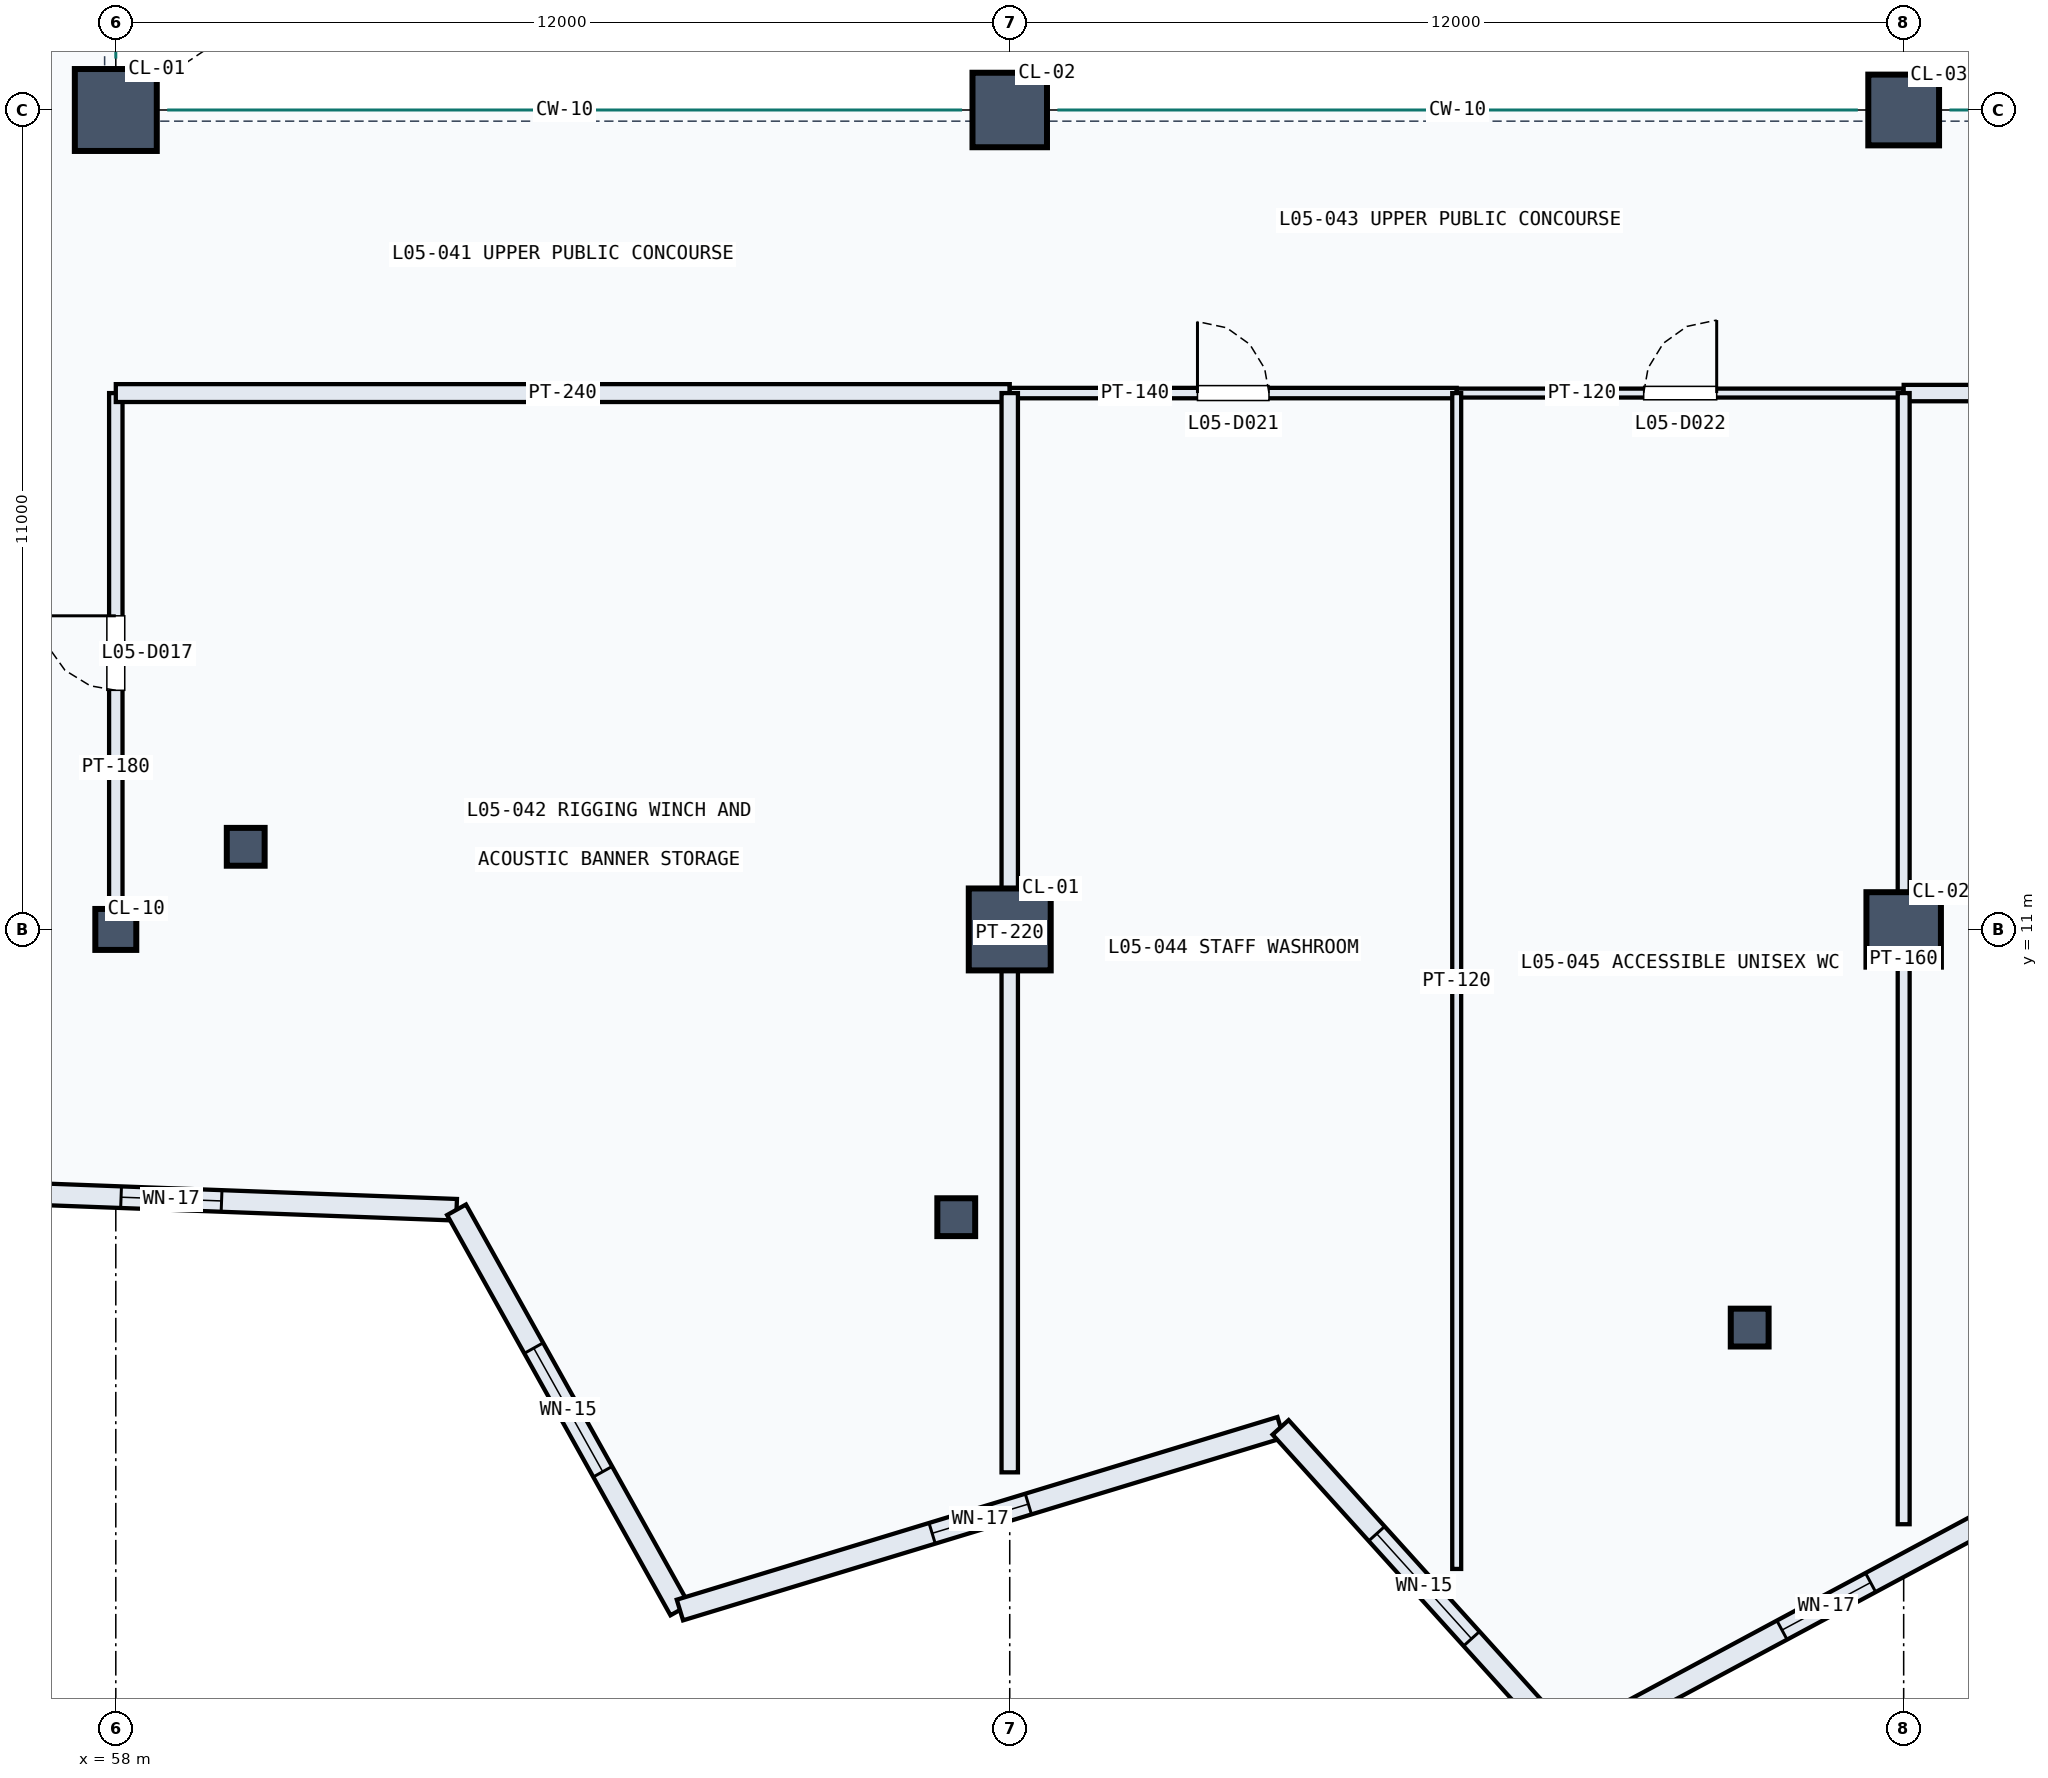
"""IFC4 building model, lengths in metres.
Left out: names, types, materials, properties, quantities, classifications, styles, units other than length and angle.
Written with IfcOpenShell. Run it as: python <this file> out.ifc"""

import sys

from ifc_helpers import new_model, si_unit, direction, frame, frame_2d, origin, origin_2d, place, context, subcontext, project, spatial, rectangle, hollow_circle, extrude, element, fill, save


model = new_model("IFC4")
c1 = context("Model", 3, precision=1e-05, world=origin(), true_north=direction((0.0, 1.0)))
c2 = subcontext(c1, "Body", "Model", "MODEL_VIEW")
j1 = project(units=[si_unit("LENGTHUNIT", "METRE"), si_unit("PLANEANGLEUNIT", "RADIAN")], contexts=[c1])
p1 = place(None, origin())
s1 = spatial("IfcSite", under=j1, at=p1, CompositionType="ELEMENT")
p2 = place(p1, origin())
s2 = spatial("IfcBuilding", under=s1, at=p2, CompositionType="ELEMENT")
p3 = place(p2, frame((0.0, 0.0, 24.3)))
s3 = spatial("IfcBuildingStorey", under=s2, at=p3, CompositionType="ELEMENT", Elevation=24.3)
p4 = place(p3, frame((58.0, 11.0, 0.0), z_axis=(0.0, 0.0, 1.0), x_axis=(1.0, 0.0, 0.0)))
e1 = element("IfcColumn", 1, at=p4, inside=s3, PredefinedType="COLUMN", context=c2, shape_type="SweptSolid", body=[
    extrude(rectangle(XDim=0.55, YDim=0.55, at=origin_2d()), origin(), (0.0, 0.0, 1.0), 5.4),
])
for number, where, z_axis, x_axis in (
    (2, (58.0, 22.0, 0.0), (0.0, 0.0, 1.0), (1.0, 0.0, 0.0)),
    (3, (70.0, 11.0, 0.0), (0.0, 0.0, 1.0), (1.0, 0.0, 0.0)),
):
    element("IfcColumn", number, at=place(p3, frame(where, z_axis=z_axis, x_axis=x_axis)), inside=s3, PredefinedType="COLUMN", context=c2, shape_type="SweptSolid", body=[
        extrude(rectangle(XDim=1.1, YDim=1.1, at=origin_2d()), origin(), (0.0, 0.0, 1.0), 5.4),
    ])
for number, where, z_axis, x_axis in (
    (4, (70.0, 22.0, 0.0), (0.0, 0.0, 1.0), (1.0, 0.0, 0.0)),
    (5, (82.0, 11.0, 0.0), (0.0, 0.0, 1.0), (1.0, 0.0, 0.0)),
):
    element("IfcColumn", number, at=place(p3, frame(where, z_axis=z_axis, x_axis=x_axis)), inside=s3, PredefinedType="COLUMN", context=c2, shape_type="SweptSolid", body=[
        extrude(rectangle(XDim=1.0, YDim=1.0, at=origin_2d()), origin(), (0.0, 0.0, 1.0), 5.4),
    ])
p5 = place(p3, frame((82.0, 22.0, 0.0), z_axis=(0.0, 0.0, 1.0), x_axis=(1.0, 0.0, 0.0)))
e6 = element("IfcColumn", 6, at=p5, inside=s3, PredefinedType="COLUMN", context=c2, shape_type="SweptSolid", body=[
    extrude(rectangle(XDim=0.95, YDim=0.95, at=origin_2d()), origin(), (0.0, 0.0, 1.0), 5.4),
])
for number, where, z_axis, x_axis in (
    (7, (59.744, 12.109, 0.0), (0.0, 0.0, 1.0), (1.0, 0.0, 0.0)),
    (8, (69.282, 7.137, 0.0), (0.0, 0.0, 1.0), (1.0, 0.0, 0.0)),
    (9, (79.933, 5.655, 0.0), (0.0, 0.0, 1.0), (1.0, 0.0, 0.0)),
):
    element("IfcColumn", number, at=place(p3, frame(where, z_axis=z_axis, x_axis=x_axis)), inside=s3, PredefinedType="COLUMN", context=c2, shape_type="SweptSolid", body=[
        extrude(hollow_circle(Radius=0.254, WallThickness=0.02, at=origin_2d()), origin(), (0.0, 0.0, 1.0), 6.05),
    ])
p6 = place(p3, frame((54.917, 7.524, 0.0), z_axis=(0.0, 0.0, 1.0), x_axis=(0.999297884119, -0.037466502319, 0.0)))
e10 = element("IfcWall", 10, at=p6, inside=s3, PredefinedType="USERDEFINED", context=c2, shape_type="SweptSolid", body=[
    extrude(rectangle(XDim=7.663, YDim=0.29, at=frame_2d((3.832, 0.0))), origin(), (0.0, 0.0, 1.0), 4.34),
])
p7 = place(p6, frame((3.156, 0.0, 0.8)))
e11 = element("IfcOpeningElement", 11, at=p7, cuts=e10, PredefinedType="OPENING", context=c2, shape_type="SweptSolid", body=[
    extrude(rectangle(XDim=1.35, YDim=2.1, at=frame_2d((0.675, 1.05))), frame((0.0, 0.155, 0.0), z_axis=(0.0, -1.0, 0.0), x_axis=(1.0, 0.0, 0.0)), (0.0, 0.0, 1.0), 0.31),
])
p8 = place(p3, frame((62.574, 7.237, 0.0), z_axis=(0.0, 0.0, 1.0), x_axis=(0.487306352228, -0.87323108, 0.0)))
e12 = element("IfcWall", 12, at=p8, inside=s3, PredefinedType="USERDEFINED", context=c2, shape_type="SweptSolid", body=[
    extrude(rectangle(XDim=6.153, YDim=0.29, at=frame_2d((3.076, 0.0))), origin(), (0.0, 0.0, 1.0), 4.34),
])
p9 = place(p8, frame((2.126, 0.0, 0.85)))
e13 = element("IfcOpeningElement", 13, at=p9, cuts=e12, PredefinedType="OPENING", context=c2, shape_type="SweptSolid", body=[
    extrude(rectangle(XDim=1.9, YDim=1.6, at=frame_2d((0.95, 0.8))), frame((0.0, 0.155, 0.0), z_axis=(0.0, -1.0, 0.0), x_axis=(1.0, 0.0, 0.0)), (0.0, 0.0, 1.0), 0.31),
])
p10 = place(p3, frame((65.573, 1.864, 0.0), z_axis=(0.0, 0.0, 1.0), x_axis=(0.956738407321, 0.290949514446, 0.0)))
e14 = element("IfcWall", 14, at=p10, inside=s3, PredefinedType="USERDEFINED", context=c2, shape_type="SweptSolid", body=[
    extrude(rectangle(XDim=8.428, YDim=0.29, at=frame_2d((4.214, 0.0))), origin(), (0.0, 0.0, 1.0), 4.34),
])
p11 = place(p10, frame((3.539, 0.0, 0.8)))
e15 = element("IfcOpeningElement", 15, at=p11, cuts=e14, PredefinedType="OPENING", context=c2, shape_type="SweptSolid", body=[
    extrude(rectangle(XDim=1.35, YDim=2.1, at=frame_2d((0.675, 1.05))), frame((0.0, 0.155, 0.0), z_axis=(0.0, -1.0, 0.0), x_axis=(1.0, 0.0, 0.0)), (0.0, 0.0, 1.0), 0.31),
])
p12 = place(p3, frame((73.636, 4.316, 0.0), z_axis=(0.0, 0.0, 1.0), x_axis=(0.670348131104, -0.742046752654, 0.0)))
e16 = element("IfcWall", 16, at=p12, inside=s3, PredefinedType="USERDEFINED", context=c2, shape_type="SweptSolid", body=[
    extrude(rectangle(XDim=5.748, YDim=0.29, at=frame_2d((2.874, 0.0))), origin(), (0.0, 0.0, 1.0), 4.34),
])
p13 = place(p12, frame((1.924, 0.0, 0.85)))
e17 = element("IfcOpeningElement", 17, at=p13, cuts=e16, PredefinedType="OPENING", context=c2, shape_type="SweptSolid", body=[
    extrude(rectangle(XDim=1.9, YDim=1.6, at=frame_2d((0.95, 0.8))), frame((0.0, 0.155, 0.0), z_axis=(0.0, -1.0, 0.0), x_axis=(1.0, 0.0, 0.0)), (0.0, 0.0, 1.0), 0.31),
])
p14 = place(p3, frame((77.489, 0.051, 0.0), z_axis=(0.0, 0.0, 1.0), x_axis=(0.881201188687, 0.472741435731, 0.0)))
e18 = element("IfcWall", 18, at=p14, inside=s3, PredefinedType="USERDEFINED", context=c2, shape_type="SweptSolid", body=[
    extrude(rectangle(XDim=7.881, YDim=0.29, at=frame_2d((3.94, 0.0))), origin(), (0.0, 0.0, 1.0), 4.34),
])
p15 = place(p14, frame((3.265, 0.0, 0.8)))
e19 = element("IfcOpeningElement", 19, at=p15, cuts=e18, PredefinedType="OPENING", context=c2, shape_type="SweptSolid", body=[
    extrude(rectangle(XDim=1.35, YDim=2.1, at=frame_2d((0.675, 1.05))), frame((0.0, 0.155, 0.0), z_axis=(0.0, -1.0, 0.0), x_axis=(1.0, 0.0, 0.0)), (0.0, 0.0, 1.0), 0.31),
])
p16 = place(p3, frame((58.0, 11.22, 0.0), z_axis=(0.0, 0.0, 1.0), x_axis=(0.0, 1.0, 0.0)))
e20 = element("IfcWall", 20, at=p16, inside=s3, PredefinedType="PARTITIONING", context=c2, shape_type="SweptSolid", body=[
    extrude(rectangle(XDim=6.98, YDim=0.18, at=frame_2d((3.49, 0.0))), origin(), (0.0, 0.0, 1.0), 5.18),
])
p17 = place(p16, frame((2.99, 0.0, 0.0)))
e21 = element("IfcOpeningElement", 21, at=p17, cuts=e20, PredefinedType="OPENING", context=c2, shape_type="SweptSolid", body=[
    extrude(rectangle(XDim=1.0, YDim=2.15, at=frame_2d((0.5, 1.075))), frame((0.0, 0.1, 0.0), z_axis=(0.0, -1.0, 0.0), x_axis=(1.0, 0.0, 0.0)), (0.0, 0.0, 1.0), 0.2),
])
p18 = place(p3, frame((58.0, 18.2, 0.0), z_axis=(0.0, 0.0, 1.0), x_axis=(1.0, 0.0, 0.0)))
e22 = element("IfcWall", 22, at=p18, inside=s3, PredefinedType="PARTITIONING", context=c2, shape_type="SweptSolid", body=[
    extrude(rectangle(XDim=12.0, YDim=0.24, at=frame_2d((6.0, 0.0))), origin(), (0.0, 0.0, 1.0), 5.18),
])
p19 = place(p3, frame((70.0, 18.2, 0.0), z_axis=(0.0, 0.0, 1.0), x_axis=(1.0, 0.0, 0.0)))
e23 = element("IfcWall", 23, at=p19, inside=s3, PredefinedType="PARTITIONING", context=c2, shape_type="SweptSolid", body=[
    extrude(rectangle(XDim=6.0, YDim=0.14, at=frame_2d((3.0, 0.0))), origin(), (0.0, 0.0, 1.0), 5.18),
])
p20 = place(p19, frame((2.52, 0.0, 0.0)))
e24 = element("IfcOpeningElement", 24, at=p20, cuts=e23, PredefinedType="OPENING", context=c2, shape_type="SweptSolid", body=[
    extrude(rectangle(XDim=0.96, YDim=2.15, at=frame_2d((0.48, 1.075))), frame((0.0, 0.08, 0.0), z_axis=(0.0, -1.0, 0.0), x_axis=(1.0, 0.0, 0.0)), (0.0, 0.0, 1.0), 0.16),
])
p21 = place(p3, frame((76.0, 18.2, 0.0), z_axis=(0.0, 0.0, 1.0), x_axis=(1.0, 0.0, 0.0)))
e25 = element("IfcWall", 25, at=p21, inside=s3, PredefinedType="PARTITIONING", context=c2, shape_type="SweptSolid", body=[
    extrude(rectangle(XDim=6.0, YDim=0.12, at=frame_2d((3.0, 0.0))), origin(), (0.0, 0.0, 1.0), 5.18),
])
p22 = place(p21, frame((2.51, 0.0, 0.0)))
e26 = element("IfcOpeningElement", 26, at=p22, cuts=e25, PredefinedType="OPENING", context=c2, shape_type="SweptSolid", body=[
    extrude(rectangle(XDim=0.98, YDim=2.1, at=frame_2d((0.49, 1.05))), frame((0.0, 0.07, 0.0), z_axis=(0.0, -1.0, 0.0), x_axis=(1.0, 0.0, 0.0)), (0.0, 0.0, 1.0), 0.14),
])
p23 = place(p3, frame((82.0, 18.2, 0.0), z_axis=(0.0, 0.0, 1.0), x_axis=(1.0, 0.0, 0.0)))
e27 = element("IfcWall", 27, at=p23, inside=s3, PredefinedType="PARTITIONING", context=c2, shape_type="SweptSolid", body=[
    extrude(rectangle(XDim=12.0, YDim=0.22, at=frame_2d((6.0, 0.0))), origin(), (0.0, 0.0, 1.0), 5.18),
])
p24 = place(p23, frame((5.47, 0.0, 0.0)))
e28 = element("IfcOpeningElement", 28, at=p24, cuts=e27, PredefinedType="OPENING", context=c2, shape_type="SweptSolid", body=[
    extrude(rectangle(XDim=1.06, YDim=2.3, at=frame_2d((0.53, 1.15))), frame((0.0, 0.12, 0.0), z_axis=(0.0, -1.0, 0.0), x_axis=(1.0, 0.0, 0.0)), (0.0, 0.0, 1.0), 0.24),
])
p25 = place(p3, frame((70.0, 3.712, 0.0), z_axis=(0.0, 0.0, 1.0), x_axis=(0.0, 1.0, 0.0)))
e29 = element("IfcWall", 29, at=p25, inside=s3, PredefinedType="PARTITIONING", context=c2, shape_type="SweptSolid", body=[
    extrude(rectangle(XDim=14.488, YDim=0.22, at=frame_2d((7.244, 0.0))), origin(), (0.0, 0.0, 1.0), 5.18),
])
p26 = place(p3, frame((76.0, 2.415, 0.0), z_axis=(0.0, 0.0, 1.0), x_axis=(0.0, 1.0, 0.0)))
e30 = element("IfcWall", 30, at=p26, inside=s3, PredefinedType="PARTITIONING", context=c2, shape_type="SweptSolid", body=[
    extrude(rectangle(XDim=15.785, YDim=0.12, at=frame_2d((7.892, 0.0))), origin(), (0.0, 0.0, 1.0), 5.18),
])
p27 = place(p3, frame((82.0, 3.016, 0.0), z_axis=(0.0, 0.0, 1.0), x_axis=(0.0, 1.0, 0.0)))
e31 = element("IfcWall", 31, at=p27, inside=s3, PredefinedType="PARTITIONING", context=c2, shape_type="SweptSolid", body=[
    extrude(rectangle(XDim=15.184, YDim=0.16, at=frame_2d((7.592, 0.0))), origin(), (0.0, 0.0, 1.0), 5.18),
])
p28 = place(p7, origin())
e32 = element("IfcWindow", 32, at=p28, inside=s3, PartitioningType="SINGLE_PANEL", PredefinedType="WINDOW", context=c2, shape_type="SweptSolid", body=[
    extrude(rectangle(XDim=1.35, YDim=2.1, at=frame_2d((0.675, 1.05))), frame((0.0, 0.03, 0.0), z_axis=(0.0, -1.0, 0.0), x_axis=(1.0, 0.0, 0.0)), (0.0, 0.0, 1.0), 0.06),
])
fill(e11, e32)
p29 = place(p9, origin())
e33 = element("IfcWindow", 33, at=p29, inside=s3, PartitioningType="SINGLE_PANEL", PredefinedType="WINDOW", context=c2, shape_type="SweptSolid", body=[
    extrude(rectangle(XDim=1.9, YDim=1.6, at=frame_2d((0.95, 0.8))), frame((0.0, 0.03, 0.0), z_axis=(0.0, -1.0, 0.0), x_axis=(1.0, 0.0, 0.0)), (0.0, 0.0, 1.0), 0.06),
])
fill(e13, e33)
p30 = place(p11, origin())
e34 = element("IfcWindow", 34, at=p30, inside=s3, PartitioningType="SINGLE_PANEL", PredefinedType="WINDOW", context=c2, shape_type="SweptSolid", body=[
    extrude(rectangle(XDim=1.35, YDim=2.1, at=frame_2d((0.675, 1.05))), frame((0.0, 0.03, 0.0), z_axis=(0.0, -1.0, 0.0), x_axis=(1.0, 0.0, 0.0)), (0.0, 0.0, 1.0), 0.06),
])
fill(e15, e34)
p31 = place(p13, origin())
e35 = element("IfcWindow", 35, at=p31, inside=s3, PartitioningType="SINGLE_PANEL", PredefinedType="WINDOW", context=c2, shape_type="SweptSolid", body=[
    extrude(rectangle(XDim=1.9, YDim=1.6, at=frame_2d((0.95, 0.8))), frame((0.0, 0.03, 0.0), z_axis=(0.0, -1.0, 0.0), x_axis=(1.0, 0.0, 0.0)), (0.0, 0.0, 1.0), 0.06),
])
fill(e17, e35)
p32 = place(p15, origin())
e36 = element("IfcWindow", 36, at=p32, inside=s3, PartitioningType="SINGLE_PANEL", PredefinedType="WINDOW", context=c2, shape_type="SweptSolid", body=[
    extrude(rectangle(XDim=1.35, YDim=2.1, at=frame_2d((0.675, 1.05))), frame((0.0, 0.03, 0.0), z_axis=(0.0, -1.0, 0.0), x_axis=(1.0, 0.0, 0.0)), (0.0, 0.0, 1.0), 0.06),
])
fill(e19, e36)
p33 = place(p17, origin())
e37 = element("IfcDoor", 37, at=p33, inside=s3, OperationType="SINGLE_SWING_RIGHT", PredefinedType="DOOR", context=c2, shape_type="SweptSolid", body=[
    extrude(rectangle(XDim=1.0, YDim=2.15, at=frame_2d((0.5, 1.075))), frame((0.0, 0.025, 0.0), z_axis=(0.0, -1.0, 0.0), x_axis=(1.0, 0.0, 0.0)), (0.0, 0.0, 1.0), 0.05),
])
fill(e21, e37)
p34 = place(p20, origin())
e38 = element("IfcDoor", 38, at=p34, inside=s3, OperationType="SINGLE_SWING_LEFT", PredefinedType="DOOR", context=c2, shape_type="SweptSolid", body=[
    extrude(rectangle(XDim=0.96, YDim=2.15, at=frame_2d((0.48, 1.075))), frame((0.0, 0.025, 0.0), z_axis=(0.0, -1.0, 0.0), x_axis=(1.0, 0.0, 0.0)), (0.0, 0.0, 1.0), 0.05),
])
fill(e24, e38)
p35 = place(p22, origin())
e39 = element("IfcDoor", 39, at=p35, inside=s3, OperationType="SINGLE_SWING_RIGHT", PredefinedType="DOOR", context=c2, shape_type="SweptSolid", body=[
    extrude(rectangle(XDim=0.98, YDim=2.1, at=frame_2d((0.49, 1.05))), frame((0.0, 0.025, 0.0), z_axis=(0.0, -1.0, 0.0), x_axis=(1.0, 0.0, 0.0)), (0.0, 0.0, 1.0), 0.05),
])
fill(e26, e39)
save(model, sys.argv[1])
